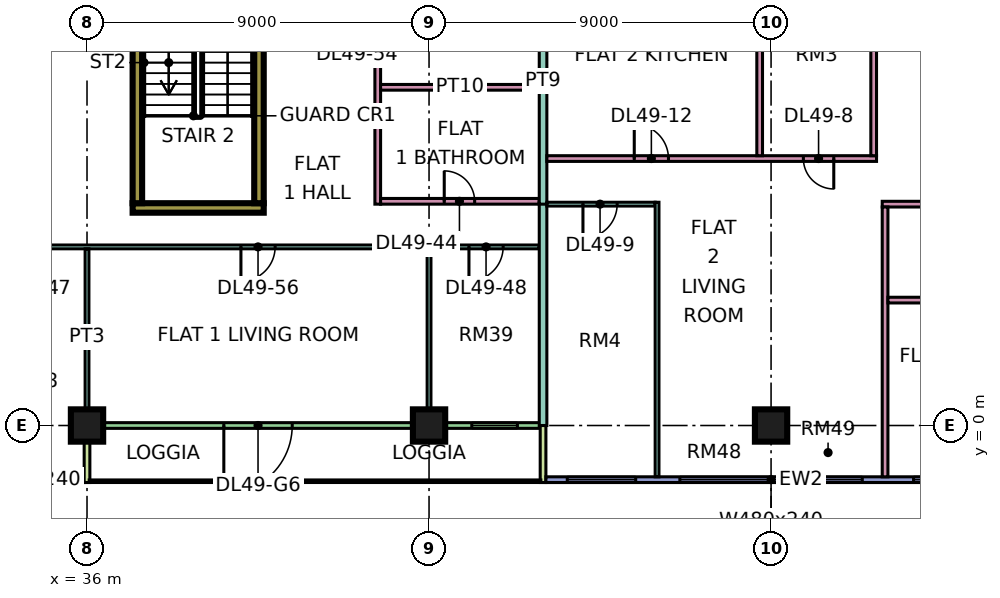
"""IFC4 building model, lengths in metres.
Left out: names, types, materials, properties, quantities, classifications, styles, units other than length and angle.
Written with IfcOpenShell. Run it as: python <this file> out.ifc"""

import sys

from ifc_helpers import new_model, si_unit, direction, frame, frame_2d, origin, origin_2d, place, context, subcontext, project, spatial, rectangle, extrude, element, fill, save


model = new_model("IFC4")
c1 = context("Model", 3, precision=1e-05, world=origin(), true_north=direction((0.0, 1.0)))
c2 = subcontext(c1, "Body", "Model", "MODEL_VIEW")
j1 = project(units=[si_unit("LENGTHUNIT", "METRE"), si_unit("PLANEANGLEUNIT", "RADIAN")], contexts=[c1])
p1 = place(None, origin())
s1 = spatial("IfcSite", under=j1, at=p1, CompositionType="ELEMENT")
p2 = place(p1, origin())
s2 = spatial("IfcBuilding", under=s1, at=p2, CompositionType="ELEMENT")
p3 = place(p2, frame((0.0, 0.0, 211.65)))
s3 = spatial("IfcBuildingStorey", under=s2, at=p3, CompositionType="ELEMENT", Elevation=211.65)
for number, where, z_axis, x_axis in (
    (1, (36.0, 0.0, 0.0), (0.0, 0.0, 1.0), (1.0, 0.0, 0.0)),
    (2, (45.0, 0.0, 0.0), (0.0, 0.0, 1.0), (1.0, 0.0, 0.0)),
    (3, (54.0, 0.0, 0.0), (0.0, 0.0, 1.0), (1.0, 0.0, 0.0)),
):
    element("IfcColumn", number, at=place(p3, frame(where, z_axis=z_axis, x_axis=x_axis)), inside=s3, PredefinedType="COLUMN", context=c2, shape_type="SweptSolid", body=[
        extrude(rectangle(XDim=0.85, YDim=0.85, at=origin_2d()), origin(), (0.0, 0.0, 1.0), 3.75),
    ])
p4 = place(p3, frame((37.2, 5.725, 0.0), z_axis=(0.0, 0.0, 1.0), x_axis=(1.0, 0.0, 0.0)))
e4 = element("IfcWall", 4, at=p4, inside=s3, PredefinedType="SHEAR", context=c2, shape_type="SweptSolid", body=[
    extrude(rectangle(XDim=3.45, YDim=0.25, at=frame_2d((1.725, 0.0))), origin(), (0.0, 0.0, 1.0), 3.75),
])
for number, where, z_axis, x_axis in (
    (5, (37.325, 5.85, 0.0), (0.0, 0.0, 1.0), (0.0, 1.0, 0.0)),
    (6, (40.525, 5.85, 0.0), (0.0, 0.0, 1.0), (0.0, 1.0, 0.0)),
):
    element("IfcWall", number, at=place(p3, frame(where, z_axis=z_axis, x_axis=x_axis)), inside=s3, PredefinedType="SHEAR", context=c2, shape_type="SweptSolid", body=[
        extrude(rectangle(XDim=6.5, YDim=0.25, at=frame_2d((3.25, 0.0))), origin(), (0.0, 0.0, 1.0), 3.75),
    ])
p5 = place(p3, frame((24.075, -1.425, 0.0), z_axis=(0.0, 0.0, 1.0), x_axis=(1.0, 0.0, 0.0)))
e7 = element("IfcWall", 7, at=p5, inside=s3, PredefinedType="SOLIDWALL", context=c2, shape_type="SweptSolid", body=[
    extrude(rectangle(XDim=11.85, YDim=0.15, at=frame_2d((5.925, 0.0))), origin(), (0.0, 0.0, 1.0), 3.35),
])
p6 = place(p5, frame((0.562, 0.0, 0.45)))
e8 = element("IfcOpeningElement", 8, at=p6, cuts=e7, PredefinedType="OPENING", context=c2, shape_type="SweptSolid", body=[
    extrude(rectangle(XDim=1.8, YDim=2.4, at=frame_2d((0.9, 1.2))), frame((0.0, 0.085, 0.0), z_axis=(0.0, -1.0, 0.0), x_axis=(1.0, 0.0, 0.0)), (0.0, 0.0, 1.0), 0.17),
])
p7 = place(p5, frame((4.425, 0.0, 0.45)))
e9 = element("IfcOpeningElement", 9, at=p7, cuts=e7, PredefinedType="OPENING", context=c2, shape_type="SweptSolid", body=[
    extrude(rectangle(XDim=3.0, YDim=2.4, at=frame_2d((1.5, 1.2))), frame((0.0, 0.085, 0.0), z_axis=(0.0, -1.0, 0.0), x_axis=(1.0, 0.0, 0.0)), (0.0, 0.0, 1.0), 0.17),
])
p8 = place(p5, frame((9.488, 0.0, 0.45)))
e10 = element("IfcOpeningElement", 10, at=p8, cuts=e7, PredefinedType="OPENING", context=c2, shape_type="SweptSolid", body=[
    extrude(rectangle(XDim=1.8, YDim=2.4, at=frame_2d((0.9, 1.2))), frame((0.0, 0.085, 0.0), z_axis=(0.0, -1.0, 0.0), x_axis=(1.0, 0.0, 0.0)), (0.0, 0.0, 1.0), 0.17),
])
p9 = place(p3, frame((36.075, 0.0, 0.0), z_axis=(0.0, 0.0, 1.0), x_axis=(1.0, 0.0, 0.0)))
e11 = element("IfcWall", 11, at=p9, inside=s3, PredefinedType="SOLIDWALL", context=c2, shape_type="SweptSolid", body=[
    extrude(rectangle(XDim=11.85, YDim=0.15, at=frame_2d((5.925, 0.0))), origin(), (0.0, 0.0, 1.0), 3.35),
])
p10 = place(p9, frame((3.525, 0.0, 0.0)))
e12 = element("IfcOpeningElement", 12, at=p10, cuts=e11, PredefinedType="OPENING", context=c2, shape_type="SweptSolid", body=[
    extrude(rectangle(XDim=1.8, YDim=2.4, at=frame_2d((0.9, 1.2))), frame((0.0, 0.085, 0.0), z_axis=(0.0, -1.0, 0.0), x_axis=(1.0, 0.0, 0.0)), (0.0, 0.0, 1.0), 0.17),
])
p11 = place(p9, frame((10.05, 0.0, 0.45)))
e13 = element("IfcOpeningElement", 13, at=p11, cuts=e11, PredefinedType="OPENING", context=c2, shape_type="SweptSolid", body=[
    extrude(rectangle(XDim=1.2, YDim=2.4, at=frame_2d((0.6, 1.2))), frame((0.0, 0.085, 0.0), z_axis=(0.0, -1.0, 0.0), x_axis=(1.0, 0.0, 0.0)), (0.0, 0.0, 1.0), 0.17),
])
for number, where, z_axis, x_axis in (
    (14, (36.0, -1.5, 0.0), (0.0, 0.0, 1.0), (0.0, 1.0, 0.0)),
    (15, (48.0, -1.5, 0.0), (0.0, 0.0, 1.0), (0.0, 1.0, 0.0)),
):
    element("IfcWall", number, at=place(p3, frame(where, z_axis=z_axis, x_axis=x_axis)), inside=s3, PredefinedType="SOLIDWALL", context=c2, shape_type="SweptSolid", body=[
        extrude(rectangle(XDim=1.5, YDim=0.15, at=frame_2d((0.75, 0.0))), origin(), (0.0, 0.0, 1.0), 3.35),
    ])
p12 = place(p3, frame((48.075, -1.425, 0.0), z_axis=(0.0, 0.0, 1.0), x_axis=(1.0, 0.0, 0.0)))
e16 = element("IfcWall", 16, at=p12, inside=s3, PredefinedType="SOLIDWALL", context=c2, shape_type="SweptSolid", body=[
    extrude(rectangle(XDim=13.425, YDim=0.15, at=frame_2d((6.712, 0.0))), origin(), (0.0, 0.0, 1.0), 3.35),
])
p13 = place(p12, frame((0.562, 0.0, 0.45)))
e17 = element("IfcOpeningElement", 17, at=p13, cuts=e16, PredefinedType="OPENING", context=c2, shape_type="SweptSolid", body=[
    extrude(rectangle(XDim=1.8, YDim=2.4, at=frame_2d((0.9, 1.2))), frame((0.0, 0.085, 0.0), z_axis=(0.0, -1.0, 0.0), x_axis=(1.0, 0.0, 0.0)), (0.0, 0.0, 1.0), 0.17),
])
p14 = place(p12, frame((3.525, 0.0, 0.45)))
e18 = element("IfcOpeningElement", 18, at=p14, cuts=e16, PredefinedType="OPENING", context=c2, shape_type="SweptSolid", body=[
    extrude(rectangle(XDim=4.8, YDim=2.4, at=frame_2d((2.4, 1.2))), frame((0.0, 0.085, 0.0), z_axis=(0.0, -1.0, 0.0), x_axis=(1.0, 0.0, 0.0)), (0.0, 0.0, 1.0), 0.17),
])
p15 = place(p12, frame((9.675, 0.0, 0.45)))
e19 = element("IfcOpeningElement", 19, at=p15, cuts=e16, PredefinedType="OPENING", context=c2, shape_type="SweptSolid", body=[
    extrude(rectangle(XDim=3.0, YDim=2.4, at=frame_2d((1.5, 1.2))), frame((0.0, 0.085, 0.0), z_axis=(0.0, -1.0, 0.0), x_axis=(1.0, 0.0, 0.0)), (0.0, 0.0, 1.0), 0.17),
])
p16 = place(p3, frame((33.05, 4.7, 0.0), z_axis=(0.0, 0.0, 1.0), x_axis=(1.0, 0.0, 0.0)))
e20 = element("IfcWall", 20, at=p16, inside=s3, PredefinedType="PARTITIONING", context=c2, shape_type="SweptSolid", body=[
    extrude(rectangle(XDim=14.85, YDim=0.1, at=frame_2d((7.425, 0.0))), origin(), (0.0, 0.0, 1.0), 3.35),
])
p17 = place(p16, frame((1.0, 0.0, 0.0)))
e21 = element("IfcOpeningElement", 21, at=p17, cuts=e20, PredefinedType="OPENING", context=c2, shape_type="SweptSolid", body=[
    extrude(rectangle(XDim=0.9, YDim=2.1, at=frame_2d((0.45, 1.05))), frame((0.0, 0.06, 0.0), z_axis=(0.0, -1.0, 0.0), x_axis=(1.0, 0.0, 0.0)), (0.0, 0.0, 1.0), 0.12),
])
p18 = place(p16, frame((13.0, 0.0, 0.0)))
e22 = element("IfcOpeningElement", 22, at=p18, cuts=e20, PredefinedType="OPENING", context=c2, shape_type="SweptSolid", body=[
    extrude(rectangle(XDim=0.9, YDim=2.1, at=frame_2d((0.45, 1.05))), frame((0.0, 0.06, 0.0), z_axis=(0.0, -1.0, 0.0), x_axis=(1.0, 0.0, 0.0)), (0.0, 0.0, 1.0), 0.12),
])
p19 = place(p16, frame((7.0, 0.0, 0.0)))
e23 = element("IfcOpeningElement", 23, at=p19, cuts=e20, PredefinedType="OPENING", context=c2, shape_type="SweptSolid", body=[
    extrude(rectangle(XDim=0.9, YDim=2.1, at=frame_2d((0.45, 1.05))), frame((0.0, 0.06, 0.0), z_axis=(0.0, -1.0, 0.0), x_axis=(1.0, 0.0, 0.0)), (0.0, 0.0, 1.0), 0.12),
])
p20 = place(p3, frame((36.0, 0.0, 0.0), z_axis=(0.0, 0.0, 1.0), x_axis=(0.0, 1.0, 0.0)))
e24 = element("IfcWall", 24, at=p20, inside=s3, PredefinedType="PARTITIONING", context=c2, shape_type="SweptSolid", body=[
    extrude(rectangle(XDim=4.65, YDim=0.1, at=frame_2d((2.325, 0.0))), origin(), (0.0, 0.0, 1.0), 3.35),
])
p21 = place(p3, frame((43.65, 5.825, 0.0), z_axis=(0.0, 0.0, 1.0), x_axis=(0.0, 1.0, 0.0)))
e25 = element("IfcWall", 25, at=p21, inside=s3, PredefinedType="PARTITIONING", context=c2, shape_type="SweptSolid", body=[
    extrude(rectangle(XDim=6.5, YDim=0.15, at=frame_2d((3.25, 0.0))), origin(), (0.0, 0.0, 1.0), 3.35),
])
p22 = place(p21, frame((4.425, 0.0, 0.0)))
e26 = element("IfcOpeningElement", 26, at=p22, cuts=e25, PredefinedType="OPENING", context=c2, shape_type="SweptSolid", body=[
    extrude(rectangle(XDim=0.9, YDim=2.1, at=frame_2d((0.45, 1.05))), frame((0.0, 0.085, 0.0), z_axis=(0.0, -1.0, 0.0), x_axis=(1.0, 0.0, 0.0)), (0.0, 0.0, 1.0), 0.17),
])
p23 = place(p3, frame((43.725, 5.9, 0.0), z_axis=(0.0, 0.0, 1.0), x_axis=(1.0, 0.0, 0.0)))
e27 = element("IfcWall", 27, at=p23, inside=s3, PredefinedType="PARTITIONING", context=c2, shape_type="SweptSolid", body=[
    extrude(rectangle(XDim=4.175, YDim=0.15, at=frame_2d((2.087, 0.0))), origin(), (0.0, 0.0, 1.0), 3.35),
])
p24 = place(p23, frame((1.675, 0.0, 0.0)))
e28 = element("IfcOpeningElement", 28, at=p24, cuts=e27, PredefinedType="OPENING", context=c2, shape_type="SweptSolid", body=[
    extrude(rectangle(XDim=0.8, YDim=2.1, at=frame_2d((0.4, 1.05))), frame((0.0, 0.085, 0.0), z_axis=(0.0, -1.0, 0.0), x_axis=(1.0, 0.0, 0.0)), (0.0, 0.0, 1.0), 0.17),
])
p25 = place(p3, frame((43.725, 8.9, 0.0), z_axis=(0.0, 0.0, 1.0), x_axis=(1.0, 0.0, 0.0)))
e29 = element("IfcWall", 29, at=p25, inside=s3, PredefinedType="PARTITIONING", context=c2, shape_type="SweptSolid", body=[
    extrude(rectangle(XDim=4.175, YDim=0.15, at=frame_2d((2.087, 0.0))), origin(), (0.0, 0.0, 1.0), 3.35),
])
p26 = place(p3, frame((45.0, 0.074, 0.0), z_axis=(0.0, 0.0, 1.0), x_axis=(0.0, 1.0, 0.0)))
e30 = element("IfcWall", 30, at=p26, inside=s3, PredefinedType="PARTITIONING", context=c2, shape_type="SweptSolid", body=[
    extrude(rectangle(XDim=4.576, YDim=0.1, at=frame_2d((2.288, 0.0))), origin(), (0.0, 0.0, 1.0), 3.35),
])
p27 = place(p3, frame((48.0, 0.0, 0.0), z_axis=(0.0, 0.0, 1.0), x_axis=(0.0, 1.0, 0.0)))
e31 = element("IfcWall", 31, at=p27, inside=s3, PredefinedType="PARTITIONING", context=c2, shape_type="SweptSolid", body=[
    extrude(rectangle(XDim=5.875, YDim=0.2, at=frame_2d((2.938, 0.0))), origin(), (0.0, 0.0, 1.0), 3.35),
])
p28 = place(p3, frame((48.0, 5.825, 0.0), z_axis=(0.0, 0.0, 1.0), x_axis=(0.0, 1.0, 0.0)))
e32 = element("IfcWall", 32, at=p28, inside=s3, PredefinedType="PARTITIONING", context=c2, shape_type="SweptSolid", body=[
    extrude(rectangle(XDim=6.5, YDim=0.2, at=frame_2d((3.25, 0.0))), origin(), (0.0, 0.0, 1.0), 3.35),
])
p29 = place(p3, frame((48.1, 5.825, 0.0), z_axis=(0.0, 0.0, 1.0), x_axis=(1.0, 0.0, 0.0)))
e33 = element("IfcWall", 33, at=p29, inside=s3, PredefinedType="PARTITIONING", context=c2, shape_type="SweptSolid", body=[
    extrude(rectangle(XDim=2.85, YDim=0.1, at=frame_2d((1.425, 0.0))), origin(), (0.0, 0.0, 1.0), 3.35),
])
p30 = place(p29, frame((0.95, 0.0, 0.0)))
e34 = element("IfcOpeningElement", 34, at=p30, cuts=e33, PredefinedType="OPENING", context=c2, shape_type="SweptSolid", body=[
    extrude(rectangle(XDim=0.9, YDim=2.1, at=frame_2d((0.45, 1.05))), frame((0.0, 0.06, 0.0), z_axis=(0.0, -1.0, 0.0), x_axis=(1.0, 0.0, 0.0)), (0.0, 0.0, 1.0), 0.12),
])
p31 = place(p3, frame((48.1, 7.025, 0.0), z_axis=(0.0, 0.0, 1.0), x_axis=(1.0, 0.0, 0.0)))
e35 = element("IfcWall", 35, at=p31, inside=s3, PredefinedType="PARTITIONING", context=c2, shape_type="SweptSolid", body=[
    extrude(rectangle(XDim=8.675, YDim=0.15, at=frame_2d((4.337, 0.0))), origin(), (0.0, 0.0, 1.0), 3.35),
])
p32 = place(p31, frame((6.75, 0.0, 0.0)))
e36 = element("IfcOpeningElement", 36, at=p32, cuts=e35, PredefinedType="OPENING", context=c2, shape_type="SweptSolid", body=[
    extrude(rectangle(XDim=0.8, YDim=2.1, at=frame_2d((0.4, 1.05))), frame((0.0, 0.085, 0.0), z_axis=(0.0, -1.0, 0.0), x_axis=(1.0, 0.0, 0.0)), (0.0, 0.0, 1.0), 0.17),
])
p33 = place(p31, frame((2.3, 0.0, 0.0)))
e37 = element("IfcOpeningElement", 37, at=p33, cuts=e35, PredefinedType="OPENING", context=c2, shape_type="SweptSolid", body=[
    extrude(rectangle(XDim=0.9, YDim=2.1, at=frame_2d((0.45, 1.05))), frame((0.0, 0.085, 0.0), z_axis=(0.0, -1.0, 0.0), x_axis=(1.0, 0.0, 0.0)), (0.0, 0.0, 1.0), 0.17),
])
p34 = place(p3, frame((51.0, -1.35, 0.0), z_axis=(0.0, 0.0, 1.0), x_axis=(0.0, 1.0, 0.0)))
e38 = element("IfcWall", 38, at=p34, inside=s3, PredefinedType="PARTITIONING", context=c2, shape_type="SweptSolid", body=[
    extrude(rectangle(XDim=7.225, YDim=0.1, at=frame_2d((3.613, 0.0))), origin(), (0.0, 0.0, 1.0), 3.35),
])
for number, where, z_axis, x_axis in (
    (39, (53.7, 7.1, 0.0), (0.0, 0.0, 1.0), (0.0, 1.0, 0.0)),
    (40, (56.7, 7.1, 0.0), (0.0, 0.0, 1.0), (0.0, 1.0, 0.0)),
):
    element("IfcWall", number, at=place(p3, frame(where, z_axis=z_axis, x_axis=x_axis)), inside=s3, PredefinedType="PARTITIONING", context=c2, shape_type="SweptSolid", body=[
        extrude(rectangle(XDim=5.225, YDim=0.15, at=frame_2d((2.612, 0.0))), origin(), (0.0, 0.0, 1.0), 3.35),
    ])
p35 = place(p3, frame((56.925, 5.825, 0.0), z_axis=(0.0, 0.0, 1.0), x_axis=(1.0, 0.0, 0.0)))
e41 = element("IfcWall", 41, at=p35, inside=s3, PredefinedType="PARTITIONING", context=c2, shape_type="SweptSolid", body=[
    extrude(rectangle(XDim=7.425, YDim=0.15, at=frame_2d((3.712, 0.0))), origin(), (0.0, 0.0, 1.0), 3.35),
])
p36 = place(p35, frame((4.125, 0.0, 0.0)))
e42 = element("IfcOpeningElement", 42, at=p36, cuts=e41, PredefinedType="OPENING", context=c2, shape_type="SweptSolid", body=[
    extrude(rectangle(XDim=0.9, YDim=2.1, at=frame_2d((0.45, 1.05))), frame((0.0, 0.085, 0.0), z_axis=(0.0, -1.0, 0.0), x_axis=(1.0, 0.0, 0.0)), (0.0, 0.0, 1.0), 0.17),
])
p37 = place(p3, frame((57.0, -1.35, 0.0), z_axis=(0.0, 0.0, 1.0), x_axis=(0.0, 1.0, 0.0)))
e43 = element("IfcWall", 43, at=p37, inside=s3, PredefinedType="PARTITIONING", context=c2, shape_type="SweptSolid", body=[
    extrude(rectangle(XDim=7.1, YDim=0.15, at=frame_2d((3.55, 0.0))), origin(), (0.0, 0.0, 1.0), 3.35),
])
p38 = place(p3, frame((57.075, 3.3, 0.0), z_axis=(0.0, 0.0, 1.0), x_axis=(1.0, 0.0, 0.0)))
e44 = element("IfcWall", 44, at=p38, inside=s3, PredefinedType="PARTITIONING", context=c2, shape_type="SweptSolid", body=[
    extrude(rectangle(XDim=3.0, YDim=0.15, at=frame_2d((1.5, 0.0))), origin(), (0.0, 0.0, 1.0), 3.35),
])
p39 = place(p8, origin())
e45 = element("IfcWindow", 45, at=p39, inside=s3, PartitioningType="SINGLE_PANEL", PredefinedType="WINDOW", context=c2, shape_type="SweptSolid", body=[
    extrude(rectangle(XDim=1.8, YDim=2.4, at=frame_2d((0.9, 1.2))), frame((0.0, 0.03, 0.0), z_axis=(0.0, -1.0, 0.0), x_axis=(1.0, 0.0, 0.0)), (0.0, 0.0, 1.0), 0.06),
])
fill(e10, e45)
p40 = place(p10, frame((1.8, 0.0, 0.0), z_axis=(0.0, 0.0, 1.0), x_axis=(-1.0, 0.0, 0.0)))
e46 = element("IfcDoor", 46, at=p40, inside=s3, OperationType="DOUBLE_DOOR_SINGLE_SWING", PredefinedType="DOOR", context=c2, shape_type="SweptSolid", body=[
    extrude(rectangle(XDim=1.8, YDim=2.4, at=frame_2d((0.9, 1.2))), frame((0.0, 0.025, 0.0), z_axis=(0.0, -1.0, 0.0), x_axis=(1.0, 0.0, 0.0)), (0.0, 0.0, 1.0), 0.05),
])
fill(e12, e46)
p41 = place(p11, origin())
e47 = element("IfcWindow", 47, at=p41, inside=s3, PartitioningType="SINGLE_PANEL", PredefinedType="WINDOW", context=c2, shape_type="SweptSolid", body=[
    extrude(rectangle(XDim=1.2, YDim=2.4, at=frame_2d((0.6, 1.2))), frame((0.0, 0.03, 0.0), z_axis=(0.0, -1.0, 0.0), x_axis=(1.0, 0.0, 0.0)), (0.0, 0.0, 1.0), 0.06),
])
fill(e13, e47)
p42 = place(p13, origin())
e48 = element("IfcWindow", 48, at=p42, inside=s3, PartitioningType="SINGLE_PANEL", PredefinedType="WINDOW", context=c2, shape_type="SweptSolid", body=[
    extrude(rectangle(XDim=1.8, YDim=2.4, at=frame_2d((0.9, 1.2))), frame((0.0, 0.03, 0.0), z_axis=(0.0, -1.0, 0.0), x_axis=(1.0, 0.0, 0.0)), (0.0, 0.0, 1.0), 0.06),
])
fill(e17, e48)
p43 = place(p14, origin())
e49 = element("IfcWindow", 49, at=p43, inside=s3, PartitioningType="SINGLE_PANEL", PredefinedType="WINDOW", context=c2, shape_type="SweptSolid", body=[
    extrude(rectangle(XDim=4.8, YDim=2.4, at=frame_2d((2.4, 1.2))), frame((0.0, 0.03, 0.0), z_axis=(0.0, -1.0, 0.0), x_axis=(1.0, 0.0, 0.0)), (0.0, 0.0, 1.0), 0.06),
])
fill(e18, e49)
p44 = place(p15, origin())
e50 = element("IfcWindow", 50, at=p44, inside=s3, PartitioningType="SINGLE_PANEL", PredefinedType="WINDOW", context=c2, shape_type="SweptSolid", body=[
    extrude(rectangle(XDim=3.0, YDim=2.4, at=frame_2d((1.5, 1.2))), frame((0.0, 0.03, 0.0), z_axis=(0.0, -1.0, 0.0), x_axis=(1.0, 0.0, 0.0)), (0.0, 0.0, 1.0), 0.06),
])
fill(e19, e50)
p45 = place(p32, origin())
e51 = element("IfcDoor", 51, at=p45, inside=s3, OperationType="SINGLE_SWING_RIGHT", PredefinedType="DOOR", context=c2, shape_type="SweptSolid", body=[
    extrude(rectangle(XDim=0.8, YDim=2.1, at=frame_2d((0.4, 1.05))), frame((0.0, 0.025, 0.0), z_axis=(0.0, -1.0, 0.0), x_axis=(1.0, 0.0, 0.0)), (0.0, 0.0, 1.0), 0.05),
])
fill(e36, e51)
p46 = place(p30, frame((0.9, 0.0, 0.0), z_axis=(0.0, 0.0, 1.0), x_axis=(-1.0, 0.0, 0.0)))
e52 = element("IfcDoor", 52, at=p46, inside=s3, OperationType="SINGLE_SWING_LEFT", PredefinedType="DOOR", context=c2, shape_type="SweptSolid", body=[
    extrude(rectangle(XDim=0.9, YDim=2.1, at=frame_2d((0.45, 1.05))), frame((0.0, 0.025, 0.0), z_axis=(0.0, -1.0, 0.0), x_axis=(1.0, 0.0, 0.0)), (0.0, 0.0, 1.0), 0.05),
])
fill(e34, e52)
p47 = place(p33, origin())
e53 = element("IfcDoor", 53, at=p47, inside=s3, OperationType="SINGLE_SWING_LEFT", PredefinedType="DOOR", context=c2, shape_type="SweptSolid", body=[
    extrude(rectangle(XDim=0.9, YDim=2.1, at=frame_2d((0.45, 1.05))), frame((0.0, 0.025, 0.0), z_axis=(0.0, -1.0, 0.0), x_axis=(1.0, 0.0, 0.0)), (0.0, 0.0, 1.0), 0.05),
])
fill(e37, e53)
p48 = place(p24, origin())
e54 = element("IfcDoor", 54, at=p48, inside=s3, OperationType="SINGLE_SWING_LEFT", PredefinedType="DOOR", context=c2, shape_type="SweptSolid", body=[
    extrude(rectangle(XDim=0.8, YDim=2.1, at=frame_2d((0.4, 1.05))), frame((0.0, 0.025, 0.0), z_axis=(0.0, -1.0, 0.0), x_axis=(1.0, 0.0, 0.0)), (0.0, 0.0, 1.0), 0.05),
])
fill(e28, e54)
p49 = place(p18, frame((0.9, 0.0, 0.0), z_axis=(0.0, 0.0, 1.0), x_axis=(-1.0, 0.0, 0.0)))
e55 = element("IfcDoor", 55, at=p49, inside=s3, OperationType="SINGLE_SWING_LEFT", PredefinedType="DOOR", context=c2, shape_type="SweptSolid", body=[
    extrude(rectangle(XDim=0.9, YDim=2.1, at=frame_2d((0.45, 1.05))), frame((0.0, 0.025, 0.0), z_axis=(0.0, -1.0, 0.0), x_axis=(1.0, 0.0, 0.0)), (0.0, 0.0, 1.0), 0.05),
])
fill(e22, e55)
p50 = place(p19, frame((0.9, 0.0, 0.0), z_axis=(0.0, 0.0, 1.0), x_axis=(-1.0, 0.0, 0.0)))
e56 = element("IfcDoor", 56, at=p50, inside=s3, OperationType="SINGLE_SWING_LEFT", PredefinedType="DOOR", context=c2, shape_type="SweptSolid", body=[
    extrude(rectangle(XDim=0.9, YDim=2.1, at=frame_2d((0.45, 1.05))), frame((0.0, 0.025, 0.0), z_axis=(0.0, -1.0, 0.0), x_axis=(1.0, 0.0, 0.0)), (0.0, 0.0, 1.0), 0.05),
])
fill(e23, e56)
save(model, sys.argv[1])
